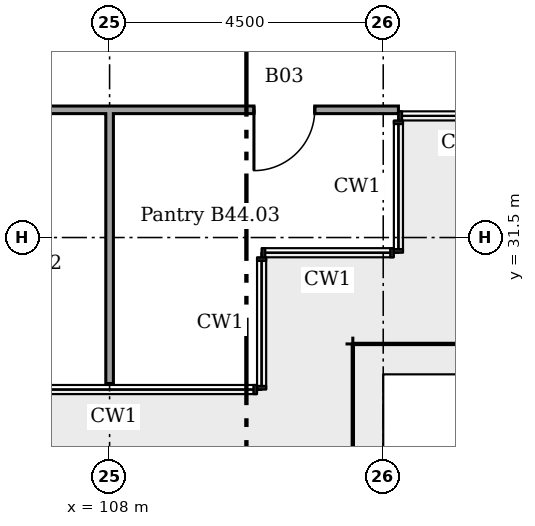
"""IFC4 building model, lengths in metres.
Left out: names, types, materials, properties, quantities, classifications, styles, units other than length and angle.
Written with IfcOpenShell. Run it as: python <this file> out.ifc"""

import sys

from ifc_helpers import new_model, si_unit, direction, frame, frame_2d, origin, place, context, subcontext, project, spatial, rectangle, extrude, element, fill, save


model = new_model("IFC4")
c1 = context("Model", 3, precision=1e-05, world=origin(), true_north=direction((0.0, 1.0)))
c2 = subcontext(c1, "Body", "Model", "MODEL_VIEW")
j1 = project(units=[si_unit("LENGTHUNIT", "METRE"), si_unit("PLANEANGLEUNIT", "RADIAN")], contexts=[c1])
p1 = place(None, origin())
s1 = spatial("IfcSite", under=j1, at=p1, CompositionType="ELEMENT")
p2 = place(p1, origin())
s2 = spatial("IfcBuilding", under=s1, at=p2, CompositionType="ELEMENT")
p3 = place(p2, frame((0.0, 0.0, 176.2)))
s3 = spatial("IfcBuildingStorey", under=s2, at=p3, CompositionType="ELEMENT", Elevation=176.2)
p4 = place(p3, frame((101.038, 33.6, 0.0)))
e1 = element("IfcWall", 1, at=p4, inside=s3, PredefinedType="PARTITIONING", context=c2, shape_type="SweptSolid", body=[
    extrude(rectangle(XDim=11.712, YDim=0.125, at=frame_2d((5.856, 0.0))), origin(), (0.0, 0.0, 1.0), 3.45),
])
p5 = place(p4, frame((2.542, 0.0, 0.0)))
e2 = element("IfcOpeningElement", 2, at=p5, cuts=e1, PredefinedType="OPENING", context=c2, shape_type="SweptSolid", body=[
    extrude(rectangle(XDim=1.0, YDim=2.1, at=frame_2d((0.5, 1.05))), frame((0.0, 0.073, 0.0), z_axis=(0.0, -1.0, 0.0), x_axis=(1.0, 0.0, 0.0)), (0.0, 0.0, 1.0), 0.145),
])
p6 = place(p4, frame((9.336, 0.0, 0.0)))
e3 = element("IfcOpeningElement", 3, at=p6, cuts=e1, PredefinedType="OPENING", context=c2, shape_type="SweptSolid", body=[
    extrude(rectangle(XDim=1.0, YDim=2.1, at=frame_2d((0.5, 1.05))), frame((0.0, 0.073, 0.0), z_axis=(0.0, -1.0, 0.0), x_axis=(1.0, 0.0, 0.0)), (0.0, 0.0, 1.0), 0.145),
])
p7 = place(p3, frame((108.0, 29.1, 0.0), z_axis=(0.0, 0.0, 1.0), x_axis=(0.0, 1.0, 0.0)))
e4 = element("IfcWall", 4, at=p7, inside=s3, PredefinedType="PARTITIONING", context=c2, shape_type="SweptSolid", body=[
    extrude(rectangle(XDim=4.5, YDim=0.125, at=frame_2d((2.25, 0.0))), origin(), (0.0, 0.0, 1.0), 2.851),
])
p8 = place(p6, frame((1.0, 0.0, 0.0), x_axis=(-1.0, 0.0, 0.0)))
e5 = element("IfcDoor", 5, at=p8, inside=s3, OperationType="SINGLE_SWING_LEFT", PredefinedType="DOOR", context=c2, shape_type="SweptSolid", body=[
    extrude(rectangle(XDim=1.0, YDim=2.1, at=frame_2d((0.5, 1.05))), frame((0.0, 0.025, 0.0), z_axis=(0.0, -1.0, 0.0), x_axis=(1.0, 0.0, 0.0)), (0.0, 0.0, 1.0), 0.05),
])
fill(e3, e5)
save(model, sys.argv[1])
